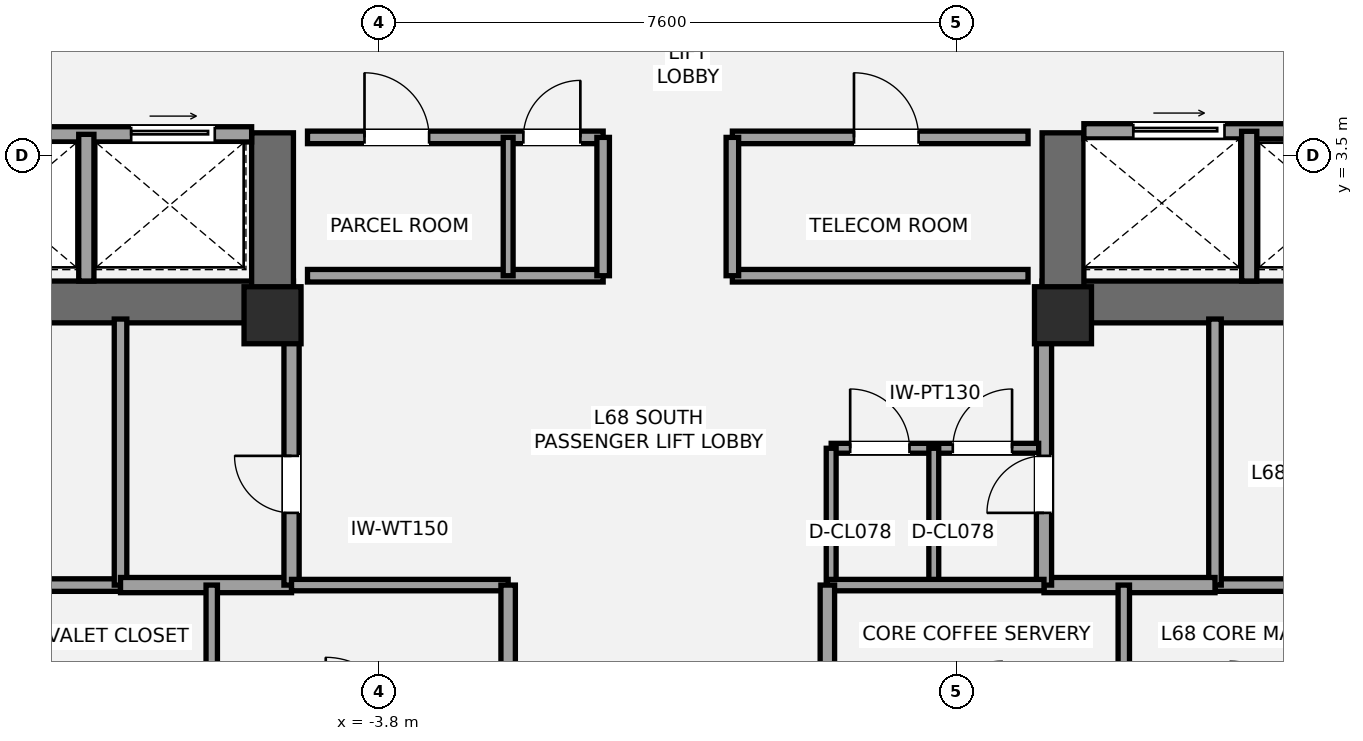
"""IFC4 building model, lengths in metres.
Left out: names, types, materials, properties, quantities, classifications, styles, units other than length and angle.
Written with IfcOpenShell. Run it as: python <this file> out.ifc"""

import sys

from ifc_helpers import new_model, si_unit, direction, frame, frame_2d, origin, origin_2d, place, context, subcontext, project, spatial, rectangle, extrude, element, fill, save


model = new_model("IFC4")
c1 = context("Model", 3, precision=1e-05, world=origin(), true_north=direction((0.0, 1.0)))
c2 = subcontext(c1, "Body", "Model", "MODEL_VIEW")
j1 = project(units=[si_unit("LENGTHUNIT", "METRE"), si_unit("PLANEANGLEUNIT", "RADIAN")], contexts=[c1])
p1 = place(None, origin())
s1 = spatial("IfcSite", under=j1, at=p1, CompositionType="ELEMENT")
p2 = place(p1, origin())
s2 = spatial("IfcBuilding", under=s1, at=p2, CompositionType="ELEMENT")
p3 = place(p2, frame((0.0, 0.0, 241.5)))
s3 = spatial("IfcBuildingStorey", under=s2, at=p3, CompositionType="ELEMENT", Elevation=241.5)
p4 = place(p3, frame((-4.925, 1.575, 0.0), z_axis=(0.0, 0.0, 1.0), x_axis=(-1.0, 0.0, 0.0)))
e1 = element("IfcWall", 1, at=p4, inside=s3, PredefinedType="SHEAR", context=c2, shape_type="SweptSolid", body=[
    extrude(rectangle(XDim=8.775, YDim=0.55, at=frame_2d((4.387, 0.0))), origin(), (0.0, 0.0, 1.0), 3.15),
])
p5 = place(p4, frame((5.375, 0.0, 0.0)))
e2 = element("IfcOpeningElement", 2, at=p5, cuts=e1, PredefinedType="OPENING", context=c2, shape_type="SweptSolid", body=[
    extrude(rectangle(XDim=1.05, YDim=2.15, at=frame_2d((0.525, 1.075))), frame((0.0, 0.285, 0.0), z_axis=(0.0, -1.0, 0.0), x_axis=(1.0, 0.0, 0.0)), (0.0, 0.0, 1.0), 0.57),
])
p6 = place(p4, frame((3.705, 0.0, 0.0)))
e3 = element("IfcOpeningElement", 3, at=p6, cuts=e1, PredefinedType="OPENING", context=c2, shape_type="SweptSolid", body=[
    extrude(rectangle(XDim=1.1, YDim=2.2, at=frame_2d((0.55, 1.1))), frame((0.0, 0.285, 0.0), z_axis=(0.0, -1.0, 0.0), x_axis=(1.0, 0.0, 0.0)), (0.0, 0.0, 1.0), 0.57),
])
p7 = place(p3, frame((-5.2, 1.3, 0.0), z_axis=(0.0, 0.0, 1.0), x_axis=(0.0, 1.0, 0.0)))
e4 = element("IfcWall", 4, at=p7, inside=s3, PredefinedType="SHEAR", context=c2, shape_type="SweptSolid", body=[
    extrude(rectangle(XDim=2.5, YDim=0.55, at=frame_2d((1.25, 0.0))), origin(), (0.0, 0.0, 1.0), 3.15),
])
p8 = place(p3, frame((13.7, 1.575, 0.0), z_axis=(0.0, 0.0, 1.0), x_axis=(-1.0, 0.0, 0.0)))
e5 = element("IfcWall", 5, at=p8, inside=s3, PredefinedType="SHEAR", context=c2, shape_type="SweptSolid", body=[
    extrude(rectangle(XDim=8.775, YDim=0.55, at=frame_2d((4.387, 0.0))), origin(), (0.0, 0.0, 1.0), 3.15),
])
p9 = place(p8, frame((2.35, 0.0, 0.0)))
e6 = element("IfcOpeningElement", 6, at=p9, cuts=e5, PredefinedType="OPENING", context=c2, shape_type="SweptSolid", body=[
    extrude(rectangle(XDim=1.05, YDim=2.15, at=frame_2d((0.525, 1.075))), frame((0.0, 0.285, 0.0), z_axis=(0.0, -1.0, 0.0), x_axis=(1.0, 0.0, 0.0)), (0.0, 0.0, 1.0), 0.57),
])
p10 = place(p8, frame((4.35, 0.0, 0.0)))
e7 = element("IfcOpeningElement", 7, at=p10, cuts=e5, PredefinedType="OPENING", context=c2, shape_type="SweptSolid", body=[
    extrude(rectangle(XDim=1.1, YDim=2.2, at=frame_2d((0.55, 1.1))), frame((0.0, 0.285, 0.0), z_axis=(0.0, -1.0, 0.0), x_axis=(1.0, 0.0, 0.0)), (0.0, 0.0, 1.0), 0.57),
])
p11 = place(p3, frame((5.2, 1.3, 0.0), z_axis=(0.0, 0.0, 1.0), x_axis=(0.0, 1.0, 0.0)))
e8 = element("IfcWall", 8, at=p11, inside=s3, PredefinedType="SHEAR", context=c2, shape_type="SweptSolid", body=[
    extrude(rectangle(XDim=2.5, YDim=0.55, at=frame_2d((1.25, 0.0))), origin(), (0.0, 0.0, 1.0), 3.15),
])
for number, where, z_axis, x_axis in (
    (9, (-5.2, 1.4, 0.0), (0.0, 0.0, 1.0), (1.0, 0.0, 0.0)),
    (10, (5.2, 1.4, 0.0), (0.0, 0.0, 1.0), (1.0, 0.0, 0.0)),
):
    element("IfcColumn", number, at=place(p3, frame(where, z_axis=z_axis, x_axis=x_axis)), inside=s3, PredefinedType="PILASTER", context=c2, shape_type="SweptSolid", body=[
        extrude(rectangle(XDim=0.75, YDim=0.75, at=origin_2d()), origin(), (0.0, 0.0, 1.0), 3.15),
    ])
p12 = place(p3, frame((-13.45, -2.15, 0.0), z_axis=(0.0, 0.0, 1.0), x_axis=(1.0, 0.0, 0.0)))
e11 = element("IfcWall", 11, at=p12, inside=s3, PredefinedType="PARTITIONING", context=c2, shape_type="SweptSolid", body=[
    extrude(rectangle(XDim=6.25, YDim=0.165, at=frame_2d((3.125, 0.0))), origin(), (0.0, 0.0, 1.0), 2.423),
])
p13 = place(p3, frame((-7.2, -2.15, 0.0), z_axis=(0.0, 0.0, 1.0), x_axis=(0.0, 1.0, 0.0)))
e12 = element("IfcWall", 12, at=p13, inside=s3, PredefinedType="PARTITIONING", context=c2, shape_type="SweptSolid", body=[
    extrude(rectangle(XDim=3.5, YDim=0.165, at=frame_2d((1.75, 0.0))), origin(), (0.0, 0.0, 1.0), 2.423),
])
p14 = place(p3, frame((-7.2, -2.15, 0.0), z_axis=(0.0, 0.0, 1.0), x_axis=(1.0, 0.0, 0.0)))
e13 = element("IfcWall", 13, at=p14, inside=s3, PredefinedType="SOLIDWALL", context=c2, shape_type="SweptSolid", body=[
    extrude(rectangle(XDim=2.25, YDim=0.2, at=frame_2d((1.125, 0.0))), origin(), (0.0, 0.0, 1.0), 2.97),
])
p15 = place(p3, frame((-4.95, -2.15, 0.0), z_axis=(0.0, 0.0, 1.0), x_axis=(0.0, 1.0, 0.0)))
e14 = element("IfcWall", 14, at=p15, inside=s3, PredefinedType="SOLIDWALL", context=c2, shape_type="SweptSolid", body=[
    extrude(rectangle(XDim=3.5, YDim=0.2, at=frame_2d((1.75, 0.0))), origin(), (0.0, 0.0, 1.0), 2.423),
])
p16 = place(p15, frame((0.95, 0.0, 0.0)))
e15 = element("IfcOpeningElement", 15, at=p16, cuts=e14, PredefinedType="OPENING", context=c2, shape_type="SweptSolid", body=[
    extrude(rectangle(XDim=0.75, YDim=2.1, at=frame_2d((0.375, 1.05))), frame((0.0, 0.11, 0.0), z_axis=(0.0, -1.0, 0.0), x_axis=(1.0, 0.0, 0.0)), (0.0, 0.0, 1.0), 0.22),
])
p17 = place(p3, frame((7.2, -2.15, 0.0), z_axis=(0.0, 0.0, 1.0), x_axis=(1.0, 0.0, 0.0)))
e16 = element("IfcWall", 16, at=p17, inside=s3, PredefinedType="PARTITIONING", context=c2, shape_type="SweptSolid", body=[
    extrude(rectangle(XDim=6.25, YDim=0.165, at=frame_2d((3.125, 0.0))), origin(), (0.0, 0.0, 1.0), 2.97),
])
p18 = place(p3, frame((7.2, -2.15, 0.0), z_axis=(0.0, 0.0, 1.0), x_axis=(0.0, 1.0, 0.0)))
e17 = element("IfcWall", 17, at=p18, inside=s3, PredefinedType="PARTITIONING", context=c2, shape_type="SweptSolid", body=[
    extrude(rectangle(XDim=3.5, YDim=0.165, at=frame_2d((1.75, 0.0))), origin(), (0.0, 0.0, 1.0), 2.423),
])
p19 = place(p3, frame((4.95, -2.15, 0.0), z_axis=(0.0, 0.0, 1.0), x_axis=(1.0, 0.0, 0.0)))
e18 = element("IfcWall", 18, at=p19, inside=s3, PredefinedType="SOLIDWALL", context=c2, shape_type="SweptSolid", body=[
    extrude(rectangle(XDim=2.25, YDim=0.2, at=frame_2d((1.125, 0.0))), origin(), (0.0, 0.0, 1.0), 2.97),
])
p20 = place(p3, frame((4.95, -2.15, 0.0), z_axis=(0.0, 0.0, 1.0), x_axis=(0.0, 1.0, 0.0)))
e19 = element("IfcWall", 19, at=p20, inside=s3, PredefinedType="SOLIDWALL", context=c2, shape_type="SweptSolid", body=[
    extrude(rectangle(XDim=3.5, YDim=0.2, at=frame_2d((1.75, 0.0))), origin(), (0.0, 0.0, 1.0), 2.423),
])
p21 = place(p20, frame((0.95, 0.0, 0.0)))
e20 = element("IfcOpeningElement", 20, at=p21, cuts=e19, PredefinedType="OPENING", context=c2, shape_type="SweptSolid", body=[
    extrude(rectangle(XDim=0.75, YDim=2.1, at=frame_2d((0.375, 1.05))), frame((0.0, 0.11, 0.0), z_axis=(0.0, -1.0, 0.0), x_axis=(1.0, 0.0, 0.0)), (0.0, 0.0, 1.0), 0.22),
])
p22 = place(p3, frame((2.15, -0.35, 0.0), z_axis=(0.0, 0.0, 1.0), x_axis=(1.0, 0.0, 0.0)))
e21 = element("IfcWall", 21, at=p22, inside=s3, PredefinedType="PARTITIONING", context=c2, shape_type="SweptSolid", body=[
    extrude(rectangle(XDim=2.73, YDim=0.13, at=frame_2d((1.365, 0.0))), origin(), (0.0, 0.0, 1.0), 2.97),
])
p23 = place(p22, frame((0.25, 0.0, 0.0)))
e22 = element("IfcOpeningElement", 22, at=p23, cuts=e21, PredefinedType="OPENING", context=c2, shape_type="SweptSolid", body=[
    extrude(rectangle(XDim=0.78, YDim=2.1, at=frame_2d((0.39, 1.05))), frame((0.0, 0.075, 0.0), z_axis=(0.0, -1.0, 0.0), x_axis=(1.0, 0.0, 0.0)), (0.0, 0.0, 1.0), 0.15),
])
p24 = place(p22, frame((1.6, 0.0, 0.0)))
e23 = element("IfcOpeningElement", 23, at=p24, cuts=e21, PredefinedType="OPENING", context=c2, shape_type="SweptSolid", body=[
    extrude(rectangle(XDim=0.78, YDim=2.1, at=frame_2d((0.39, 1.05))), frame((0.0, 0.075, 0.0), z_axis=(0.0, -1.0, 0.0), x_axis=(1.0, 0.0, 0.0)), (0.0, 0.0, 1.0), 0.15),
])
for number, where, z_axis, x_axis in (
    (24, (2.15, -2.15, 0.0), (0.0, 0.0, 1.0), (0.0, 1.0, 0.0)),
    (25, (3.5, -2.15, 0.0), (0.0, 0.0, 1.0), (0.0, 1.0, 0.0)),
):
    element("IfcWall", number, at=place(p3, frame(where, z_axis=z_axis, x_axis=x_axis)), inside=s3, PredefinedType="PARTITIONING", context=c2, shape_type="SweptSolid", body=[
        extrude(rectangle(XDim=1.8, YDim=0.13, at=frame_2d((0.9, 0.0))), origin(), (0.0, 0.0, 1.0), 2.97),
    ])
p25 = place(p3, frame((-9.78, 3.78, 0.0), z_axis=(0.0, 0.0, 1.0), x_axis=(1.0, 0.0, 0.0)))
e26 = element("IfcWall", 26, at=p25, inside=s3, PredefinedType="SOLIDWALL", context=c2, shape_type="SweptSolid", body=[
    extrude(rectangle(XDim=4.305, YDim=0.2, at=frame_2d((2.152, 0.0))), origin(), (0.0, 0.0, 1.0), 2.97),
])
p26 = place(p25, frame((2.72, 0.0, 0.0)))
e27 = element("IfcOpeningElement", 27, at=p26, cuts=e26, PredefinedType="OPENING", context=c2, shape_type="SweptSolid", body=[
    extrude(rectangle(XDim=1.1, YDim=2.2, at=frame_2d((0.55, 1.1))), frame((0.0, 0.11, 0.0), z_axis=(0.0, -1.0, 0.0), x_axis=(1.0, 0.0, 0.0)), (0.0, 0.0, 1.0), 0.22),
])
p27 = place(p3, frame((-7.65, 1.85, 0.0), z_axis=(0.0, 0.0, 1.0), x_axis=(0.0, 1.0, 0.0)))
e28 = element("IfcWall", 28, at=p27, inside=s3, PredefinedType="SOLIDWALL", context=c2, shape_type="SweptSolid", body=[
    extrude(rectangle(XDim=1.93, YDim=0.2, at=frame_2d((0.965, 0.0))), origin(), (0.0, 0.0, 1.0), 2.97),
])
p28 = place(p3, frame((5.475, 3.82, 0.0), z_axis=(0.0, 0.0, 1.0), x_axis=(1.0, 0.0, 0.0)))
e29 = element("IfcWall", 29, at=p28, inside=s3, PredefinedType="SOLIDWALL", context=c2, shape_type="SweptSolid", body=[
    extrude(rectangle(XDim=4.305, YDim=0.2, at=frame_2d((2.152, 0.0))), origin(), (0.0, 0.0, 1.0), 2.97),
])
p29 = place(p28, frame((0.65, 0.0, 0.0)))
e30 = element("IfcOpeningElement", 30, at=p29, cuts=e29, PredefinedType="OPENING", context=c2, shape_type="SweptSolid", body=[
    extrude(rectangle(XDim=1.2, YDim=2.2, at=frame_2d((0.6, 1.1))), frame((0.0, 0.11, 0.0), z_axis=(0.0, -1.0, 0.0), x_axis=(1.0, 0.0, 0.0)), (0.0, 0.0, 1.0), 0.22),
])
p30 = place(p3, frame((7.65, 1.85, 0.0), z_axis=(0.0, 0.0, 1.0), x_axis=(0.0, 1.0, 0.0)))
e31 = element("IfcWall", 31, at=p30, inside=s3, PredefinedType="SOLIDWALL", context=c2, shape_type="SweptSolid", body=[
    extrude(rectangle(XDim=1.97, YDim=0.2, at=frame_2d((0.985, 0.0))), origin(), (0.0, 0.0, 1.0), 2.97),
])
p31 = place(p3, frame((-4.74, 1.92, 0.0), z_axis=(0.0, 0.0, 1.0), x_axis=(1.0, 0.0, 0.0)))
e32 = element("IfcWall", 32, at=p31, inside=s3, PredefinedType="PARTITIONING", context=c2, shape_type="SweptSolid", body=[
    extrude(rectangle(XDim=3.89, YDim=0.165, at=frame_2d((1.945, 0.0))), origin(), (0.0, 0.0, 1.0), 2.11),
])
p32 = place(p3, frame((-4.74, 3.74, 0.0), z_axis=(0.0, 0.0, 1.0), x_axis=(1.0, 0.0, 0.0)))
e33 = element("IfcWall", 33, at=p32, inside=s3, PredefinedType="PARTITIONING", context=c2, shape_type="SweptSolid", body=[
    extrude(rectangle(XDim=3.89, YDim=0.165, at=frame_2d((1.945, 0.0))), origin(), (0.0, 0.0, 1.0), 2.97),
])
p33 = place(p32, frame((0.75, 0.0, 0.0)))
e34 = element("IfcOpeningElement", 34, at=p33, cuts=e33, PredefinedType="OPENING", context=c2, shape_type="SweptSolid", body=[
    extrude(rectangle(XDim=0.85, YDim=2.1, at=frame_2d((0.425, 1.05))), frame((0.0, 0.093, 0.0), z_axis=(0.0, -1.0, 0.0), x_axis=(1.0, 0.0, 0.0)), (0.0, 0.0, 1.0), 0.185),
])
p34 = place(p32, frame((2.84, 0.0, 0.0)))
e35 = element("IfcOpeningElement", 35, at=p34, cuts=e33, PredefinedType="OPENING", context=c2, shape_type="SweptSolid", body=[
    extrude(rectangle(XDim=0.75, YDim=2.1, at=frame_2d((0.375, 1.05))), frame((0.0, 0.093, 0.0), z_axis=(0.0, -1.0, 0.0), x_axis=(1.0, 0.0, 0.0)), (0.0, 0.0, 1.0), 0.185),
])
p35 = place(p3, frame((-0.85, 1.92, 0.0), z_axis=(0.0, 0.0, 1.0), x_axis=(0.0, 1.0, 0.0)))
e36 = element("IfcWall", 36, at=p35, inside=s3, PredefinedType="PARTITIONING", context=c2, shape_type="SweptSolid", body=[
    extrude(rectangle(XDim=1.82, YDim=0.165, at=frame_2d((0.91, 0.0))), origin(), (0.0, 0.0, 1.0), 2.97),
])
p36 = place(p3, frame((0.85, 1.92, 0.0), z_axis=(0.0, 0.0, 1.0), x_axis=(1.0, 0.0, 0.0)))
e37 = element("IfcWall", 37, at=p36, inside=s3, PredefinedType="PARTITIONING", context=c2, shape_type="SweptSolid", body=[
    extrude(rectangle(XDim=3.89, YDim=0.165, at=frame_2d((1.945, 0.0))), origin(), (0.0, 0.0, 1.0), 2.11),
])
p37 = place(p3, frame((0.85, 3.74, 0.0), z_axis=(0.0, 0.0, 1.0), x_axis=(1.0, 0.0, 0.0)))
e38 = element("IfcWall", 38, at=p37, inside=s3, PredefinedType="PARTITIONING", context=c2, shape_type="SweptSolid", body=[
    extrude(rectangle(XDim=3.89, YDim=0.165, at=frame_2d((1.945, 0.0))), origin(), (0.0, 0.0, 1.0), 2.97),
])
p38 = place(p37, frame((1.6, 0.0, 0.0)))
e39 = element("IfcOpeningElement", 39, at=p38, cuts=e38, PredefinedType="OPENING", context=c2, shape_type="SweptSolid", body=[
    extrude(rectangle(XDim=0.85, YDim=2.1, at=frame_2d((0.425, 1.05))), frame((0.0, 0.093, 0.0), z_axis=(0.0, -1.0, 0.0), x_axis=(1.0, 0.0, 0.0)), (0.0, 0.0, 1.0), 0.185),
])
p39 = place(p3, frame((0.85, 1.92, 0.0), z_axis=(0.0, 0.0, 1.0), x_axis=(0.0, 1.0, 0.0)))
e40 = element("IfcWall", 40, at=p39, inside=s3, PredefinedType="PARTITIONING", context=c2, shape_type="SweptSolid", body=[
    extrude(rectangle(XDim=1.82, YDim=0.165, at=frame_2d((0.91, 0.0))), origin(), (0.0, 0.0, 1.0), 2.97),
])
p40 = place(p3, frame((-2.1, 1.92, 0.0), z_axis=(0.0, 0.0, 1.0), x_axis=(0.0, 1.0, 0.0)))
e41 = element("IfcWall", 41, at=p40, inside=s3, PredefinedType="PARTITIONING", context=c2, shape_type="SweptSolid", body=[
    extrude(rectangle(XDim=1.82, YDim=0.13, at=frame_2d((0.91, 0.0))), origin(), (0.0, 0.0, 1.0), 2.97),
])
p41 = place(p3, frame((-4.95, -2.15, 0.0), z_axis=(0.0, 0.0, 1.0), x_axis=(1.0, 0.0, 0.0)))
e42 = element("IfcWall", 42, at=p41, inside=s3, PredefinedType="PLUMBINGWALL", context=c2, shape_type="SweptSolid", body=[
    extrude(rectangle(XDim=2.85, YDim=0.15, at=frame_2d((1.425, 0.0))), origin(), (0.0, 0.0, 1.0), 2.97),
])
p42 = place(p3, frame((-2.1, -4.05, 0.0), z_axis=(0.0, 0.0, 1.0), x_axis=(0.0, 1.0, 0.0)))
e43 = element("IfcWall", 43, at=p42, inside=s3, PredefinedType="PLUMBINGWALL", context=c2, shape_type="SweptSolid", body=[
    extrude(rectangle(XDim=1.9, YDim=0.19, at=frame_2d((0.95, 0.0))), origin(), (0.0, 0.0, 1.0), 2.423),
])
p43 = place(p3, frame((-6.0, -4.05, 0.0), z_axis=(0.0, 0.0, 1.0), x_axis=(0.0, 1.0, 0.0)))
e44 = element("IfcWall", 44, at=p43, inside=s3, PredefinedType="PLUMBINGWALL", context=c2, shape_type="SweptSolid", body=[
    extrude(rectangle(XDim=1.9, YDim=0.15, at=frame_2d((0.95, 0.0))), origin(), (0.0, 0.0, 1.0), 2.431),
])
p44 = place(p3, frame((2.1, -2.15, 0.0), z_axis=(0.0, 0.0, 1.0), x_axis=(1.0, 0.0, 0.0)))
e45 = element("IfcWall", 45, at=p44, inside=s3, PredefinedType="PLUMBINGWALL", context=c2, shape_type="SweptSolid", body=[
    extrude(rectangle(XDim=2.85, YDim=0.15, at=frame_2d((1.425, 0.0))), origin(), (0.0, 0.0, 1.0), 2.97),
])
p45 = place(p3, frame((2.1, -4.05, 0.0), z_axis=(0.0, 0.0, 1.0), x_axis=(0.0, 1.0, 0.0)))
e46 = element("IfcWall", 46, at=p45, inside=s3, PredefinedType="PLUMBINGWALL", context=c2, shape_type="SweptSolid", body=[
    extrude(rectangle(XDim=1.9, YDim=0.19, at=frame_2d((0.95, 0.0))), origin(), (0.0, 0.0, 1.0), 2.97),
])
p46 = place(p3, frame((6.0, -4.05, 0.0), z_axis=(0.0, 0.0, 1.0), x_axis=(0.0, 1.0, 0.0)))
e47 = element("IfcWall", 47, at=p46, inside=s3, PredefinedType="PLUMBINGWALL", context=c2, shape_type="SweptSolid", body=[
    extrude(rectangle(XDim=1.9, YDim=0.15, at=frame_2d((0.95, 0.0))), origin(), (0.0, 0.0, 1.0), 2.431),
])
p47 = place(p16, origin())
e48 = element("IfcDoor", 48, at=p47, inside=s3, OperationType="SINGLE_SWING_RIGHT", PredefinedType="DOOR", context=c2, shape_type="SweptSolid", body=[
    extrude(rectangle(XDim=0.75, YDim=2.1, at=frame_2d((0.375, 1.05))), frame((0.0, 0.025, 0.0), z_axis=(0.0, -1.0, 0.0), x_axis=(1.0, 0.0, 0.0)), (0.0, 0.0, 1.0), 0.05),
])
fill(e15, e48)
p48 = place(p21, origin())
e49 = element("IfcDoor", 49, at=p48, inside=s3, OperationType="SINGLE_SWING_LEFT", PredefinedType="DOOR", context=c2, shape_type="SweptSolid", body=[
    extrude(rectangle(XDim=0.75, YDim=2.1, at=frame_2d((0.375, 1.05))), frame((0.0, 0.025, 0.0), z_axis=(0.0, -1.0, 0.0), x_axis=(1.0, 0.0, 0.0)), (0.0, 0.0, 1.0), 0.05),
])
fill(e20, e49)
p49 = place(p23, origin())
e50 = element("IfcDoor", 50, at=p49, inside=s3, OperationType="SINGLE_SWING_LEFT", PredefinedType="DOOR", context=c2, shape_type="SweptSolid", body=[
    extrude(rectangle(XDim=0.78, YDim=2.1, at=frame_2d((0.39, 1.05))), frame((0.0, 0.025, 0.0), z_axis=(0.0, -1.0, 0.0), x_axis=(1.0, 0.0, 0.0)), (0.0, 0.0, 1.0), 0.05),
])
fill(e22, e50)
p50 = place(p24, origin())
e51 = element("IfcDoor", 51, at=p50, inside=s3, OperationType="SINGLE_SWING_RIGHT", PredefinedType="DOOR", context=c2, shape_type="SweptSolid", body=[
    extrude(rectangle(XDim=0.78, YDim=2.1, at=frame_2d((0.39, 1.05))), frame((0.0, 0.025, 0.0), z_axis=(0.0, -1.0, 0.0), x_axis=(1.0, 0.0, 0.0)), (0.0, 0.0, 1.0), 0.05),
])
fill(e23, e51)
p51 = place(p26, origin())
e52 = element("IfcDoor", 52, at=p51, inside=s3, OperationType="SLIDING_TO_LEFT", PredefinedType="DOOR", context=c2, shape_type="SweptSolid", body=[
    extrude(rectangle(XDim=1.1, YDim=2.2, at=frame_2d((0.55, 1.1))), frame((0.0, 0.025, 0.0), z_axis=(0.0, -1.0, 0.0), x_axis=(1.0, 0.0, 0.0)), (0.0, 0.0, 1.0), 0.05),
])
fill(e27, e52)
p52 = place(p29, origin())
e53 = element("IfcDoor", 53, at=p52, inside=s3, OperationType="SLIDING_TO_RIGHT", PredefinedType="DOOR", context=c2, shape_type="SweptSolid", body=[
    extrude(rectangle(XDim=1.2, YDim=2.2, at=frame_2d((0.6, 1.1))), frame((0.0, 0.025, 0.0), z_axis=(0.0, -1.0, 0.0), x_axis=(1.0, 0.0, 0.0)), (0.0, 0.0, 1.0), 0.05),
])
fill(e30, e53)
p53 = place(p33, origin())
e54 = element("IfcDoor", 54, at=p53, inside=s3, OperationType="SINGLE_SWING_LEFT", PredefinedType="DOOR", context=c2, shape_type="SweptSolid", body=[
    extrude(rectangle(XDim=0.85, YDim=2.1, at=frame_2d((0.425, 1.05))), frame((0.0, 0.025, 0.0), z_axis=(0.0, -1.0, 0.0), x_axis=(1.0, 0.0, 0.0)), (0.0, 0.0, 1.0), 0.05),
])
fill(e34, e54)
p54 = place(p34, origin())
e55 = element("IfcDoor", 55, at=p54, inside=s3, OperationType="SINGLE_SWING_RIGHT", PredefinedType="DOOR", context=c2, shape_type="SweptSolid", body=[
    extrude(rectangle(XDim=0.75, YDim=2.1, at=frame_2d((0.375, 1.05))), frame((0.0, 0.025, 0.0), z_axis=(0.0, -1.0, 0.0), x_axis=(1.0, 0.0, 0.0)), (0.0, 0.0, 1.0), 0.05),
])
fill(e35, e55)
p55 = place(p38, origin())
e56 = element("IfcDoor", 56, at=p55, inside=s3, OperationType="SINGLE_SWING_LEFT", PredefinedType="DOOR", context=c2, shape_type="SweptSolid", body=[
    extrude(rectangle(XDim=0.85, YDim=2.1, at=frame_2d((0.425, 1.05))), frame((0.0, 0.025, 0.0), z_axis=(0.0, -1.0, 0.0), x_axis=(1.0, 0.0, 0.0)), (0.0, 0.0, 1.0), 0.05),
])
fill(e39, e56)
save(model, sys.argv[1])
